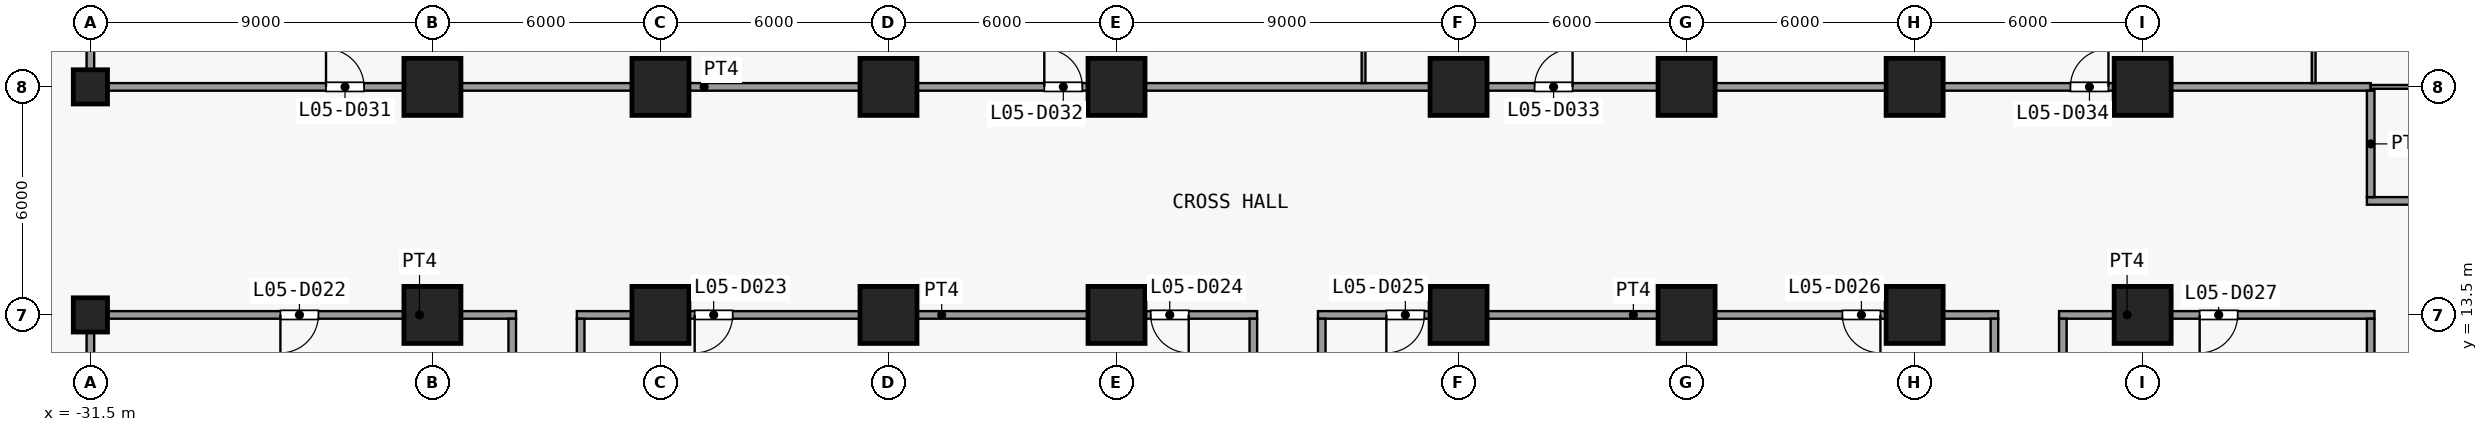
"""IFC4 building model, lengths in metres.
Left out: names, types, materials, properties, quantities, classifications, styles, units other than length and angle.
Written with IfcOpenShell. Run it as: python <this file> out.ifc"""

import sys

from ifc_helpers import new_model, si_unit, direction, frame, frame_2d, origin, origin_2d, place, context, subcontext, project, spatial, rectangle, extrude, element, fill, save


model = new_model("IFC4")
c1 = context("Model", 3, precision=1e-05, world=origin(), true_north=direction((0.0, 1.0)))
c2 = subcontext(c1, "Body", "Model", "MODEL_VIEW")
j1 = project(units=[si_unit("LENGTHUNIT", "METRE"), si_unit("PLANEANGLEUNIT", "RADIAN")], contexts=[c1])
p1 = place(None, origin())
s1 = spatial("IfcSite", under=j1, at=p1, CompositionType="ELEMENT")
p2 = place(p1, origin())
s2 = spatial("IfcBuilding", under=s1, at=p2, CompositionType="ELEMENT")
p3 = place(p2, frame((0.0, 0.0, 28.0)))
s3 = spatial("IfcBuildingStorey", under=s2, at=p3, CompositionType="ELEMENT", Elevation=28.0)
for number, where, z_axis, x_axis in (
    (1, (-31.5, 13.5, 0.0), (0.0, 0.0, 1.0), (1.0, 0.0, 0.0)),
    (2, (-31.5, 19.5, 0.0), (0.0, 0.0, 1.0), (1.0, 0.0, 0.0)),
):
    element("IfcColumn", number, at=place(p3, frame(where, z_axis=z_axis, x_axis=x_axis)), inside=s3, PredefinedType="COLUMN", context=c2, shape_type="SweptSolid", body=[
        extrude(rectangle(XDim=0.9, YDim=0.9, at=origin_2d()), origin(), (0.0, 0.0, 1.0), 4.5),
    ])
for number, where, z_axis, x_axis in (
    (3, (-22.5, 13.5, 0.0), (0.0, 0.0, 1.0), (1.0, 0.0, 0.0)),
    (4, (-22.5, 19.5, 0.0), (0.0, 0.0, 1.0), (1.0, 0.0, 0.0)),
    (5, (-16.5, 13.5, 0.0), (0.0, 0.0, 1.0), (1.0, 0.0, 0.0)),
    (6, (-16.5, 19.5, 0.0), (0.0, 0.0, 1.0), (1.0, 0.0, 0.0)),
    (7, (-10.5, 13.5, 0.0), (0.0, 0.0, 1.0), (1.0, 0.0, 0.0)),
    (8, (-10.5, 19.5, 0.0), (0.0, 0.0, 1.0), (1.0, 0.0, 0.0)),
    (9, (-4.5, 13.5, 0.0), (0.0, 0.0, 1.0), (1.0, 0.0, 0.0)),
    (10, (-4.5, 19.5, 0.0), (0.0, 0.0, 1.0), (1.0, 0.0, 0.0)),
    (11, (4.5, 13.5, 0.0), (0.0, 0.0, 1.0), (1.0, 0.0, 0.0)),
    (12, (4.5, 19.5, 0.0), (0.0, 0.0, 1.0), (1.0, 0.0, 0.0)),
    (13, (10.5, 13.5, 0.0), (0.0, 0.0, 1.0), (1.0, 0.0, 0.0)),
    (14, (10.5, 19.5, 0.0), (0.0, 0.0, 1.0), (1.0, 0.0, 0.0)),
    (15, (16.5, 13.5, 0.0), (0.0, 0.0, 1.0), (1.0, 0.0, 0.0)),
    (16, (16.5, 19.5, 0.0), (0.0, 0.0, 1.0), (1.0, 0.0, 0.0)),
    (17, (22.5, 13.5, 0.0), (0.0, 0.0, 1.0), (1.0, 0.0, 0.0)),
    (18, (22.5, 19.5, 0.0), (0.0, 0.0, 1.0), (1.0, 0.0, 0.0)),
):
    element("IfcColumn", number, at=place(p3, frame(where, z_axis=z_axis, x_axis=x_axis)), inside=s3, PredefinedType="COLUMN", context=c2, shape_type="SweptSolid", body=[
        extrude(rectangle(XDim=1.5, YDim=1.5, at=origin_2d()), origin(), (0.0, 0.0, 1.0), 4.5),
    ])
p4 = place(p3, frame((-31.6, 13.5, 0.0), z_axis=(0.0, 0.0, 1.0), x_axis=(1.0, 0.0, 0.0)))
e19 = element("IfcWall", 19, at=p4, inside=s3, PredefinedType="PARTITIONING", context=c2, shape_type="SweptSolid", body=[
    extrude(rectangle(XDim=11.3, YDim=0.2, at=frame_2d((5.65, 0.0))), origin(), (0.0, 0.0, 1.0), 4.1),
])
p5 = place(p4, frame((5.1, 0.0, 0.0)))
e20 = element("IfcOpeningElement", 20, at=p5, cuts=e19, PredefinedType="OPENING", context=c2, shape_type="SweptSolid", body=[
    extrude(rectangle(XDim=1.0, YDim=2.1, at=frame_2d((0.5, 1.05))), frame((0.0, 0.11, 0.0), z_axis=(0.0, -1.0, 0.0), x_axis=(1.0, 0.0, 0.0)), (0.0, 0.0, 1.0), 0.22),
])
p6 = place(p3, frame((-18.7, 13.5, 0.0), z_axis=(0.0, 0.0, 1.0), x_axis=(1.0, 0.0, 0.0)))
e21 = element("IfcWall", 21, at=p6, inside=s3, PredefinedType="PARTITIONING", context=c2, shape_type="SweptSolid", body=[
    extrude(rectangle(XDim=17.9, YDim=0.2, at=frame_2d((8.95, 0.0))), origin(), (0.0, 0.0, 1.0), 4.1),
])
p7 = place(p6, frame((3.1, 0.0, 0.0)))
e22 = element("IfcOpeningElement", 22, at=p7, cuts=e21, PredefinedType="OPENING", context=c2, shape_type="SweptSolid", body=[
    extrude(rectangle(XDim=1.0, YDim=2.1, at=frame_2d((0.5, 1.05))), frame((0.0, 0.11, 0.0), z_axis=(0.0, -1.0, 0.0), x_axis=(1.0, 0.0, 0.0)), (0.0, 0.0, 1.0), 0.22),
])
p8 = place(p6, frame((15.1, 0.0, 0.0)))
e23 = element("IfcOpeningElement", 23, at=p8, cuts=e21, PredefinedType="OPENING", context=c2, shape_type="SweptSolid", body=[
    extrude(rectangle(XDim=1.0, YDim=2.1, at=frame_2d((0.5, 1.05))), frame((0.0, 0.11, 0.0), z_axis=(0.0, -1.0, 0.0), x_axis=(1.0, 0.0, 0.0)), (0.0, 0.0, 1.0), 0.22),
])
p9 = place(p3, frame((0.8, 13.5, 0.0), z_axis=(0.0, 0.0, 1.0), x_axis=(1.0, 0.0, 0.0)))
e24 = element("IfcWall", 24, at=p9, inside=s3, PredefinedType="PARTITIONING", context=c2, shape_type="SweptSolid", body=[
    extrude(rectangle(XDim=17.9, YDim=0.2, at=frame_2d((8.95, 0.0))), origin(), (0.0, 0.0, 1.0), 4.1),
])
p10 = place(p9, frame((1.8, 0.0, 0.0)))
e25 = element("IfcOpeningElement", 25, at=p10, cuts=e24, PredefinedType="OPENING", context=c2, shape_type="SweptSolid", body=[
    extrude(rectangle(XDim=1.0, YDim=2.1, at=frame_2d((0.5, 1.05))), frame((0.0, 0.11, 0.0), z_axis=(0.0, -1.0, 0.0), x_axis=(1.0, 0.0, 0.0)), (0.0, 0.0, 1.0), 0.22),
])
p11 = place(p9, frame((13.8, 0.0, 0.0)))
e26 = element("IfcOpeningElement", 26, at=p11, cuts=e24, PredefinedType="OPENING", context=c2, shape_type="SweptSolid", body=[
    extrude(rectangle(XDim=1.0, YDim=2.1, at=frame_2d((0.5, 1.05))), frame((0.0, 0.11, 0.0), z_axis=(0.0, -1.0, 0.0), x_axis=(1.0, 0.0, 0.0)), (0.0, 0.0, 1.0), 0.22),
])
p12 = place(p3, frame((20.3, 13.5, 0.0), z_axis=(0.0, 0.0, 1.0), x_axis=(1.0, 0.0, 0.0)))
e27 = element("IfcWall", 27, at=p12, inside=s3, PredefinedType="PARTITIONING", context=c2, shape_type="SweptSolid", body=[
    extrude(rectangle(XDim=8.3, YDim=0.2, at=frame_2d((4.15, 0.0))), origin(), (0.0, 0.0, 1.0), 4.1),
])
p13 = place(p12, frame((3.7, 0.0, 0.0)))
e28 = element("IfcOpeningElement", 28, at=p13, cuts=e27, PredefinedType="OPENING", context=c2, shape_type="SweptSolid", body=[
    extrude(rectangle(XDim=1.0, YDim=2.1, at=frame_2d((0.5, 1.05))), frame((0.0, 0.11, 0.0), z_axis=(0.0, -1.0, 0.0), x_axis=(1.0, 0.0, 0.0)), (0.0, 0.0, 1.0), 0.22),
])
p14 = place(p3, frame((28.4, 16.5, 0.0), z_axis=(0.0, 0.0, 1.0), x_axis=(1.0, 0.0, 0.0)))
e29 = element("IfcWall", 29, at=p14, inside=s3, PredefinedType="PARTITIONING", context=c2, shape_type="SweptSolid", body=[
    extrude(rectangle(XDim=24.2, YDim=0.2, at=frame_2d((12.1, 0.0))), origin(), (0.0, 0.0, 1.0), 4.1),
])
p15 = place(p14, frame((6.2, 0.0, 0.0)))
e30 = element("IfcOpeningElement", 30, at=p15, cuts=e29, PredefinedType="OPENING", context=c2, shape_type="SweptSolid", body=[
    extrude(rectangle(XDim=1.0, YDim=2.1, at=frame_2d((0.5, 1.05))), frame((0.0, 0.11, 0.0), z_axis=(0.0, -1.0, 0.0), x_axis=(1.0, 0.0, 0.0)), (0.0, 0.0, 1.0), 0.22),
])
p16 = place(p14, frame((17.0, 0.0, 0.0)))
e31 = element("IfcOpeningElement", 31, at=p16, cuts=e29, PredefinedType="OPENING", context=c2, shape_type="SweptSolid", body=[
    extrude(rectangle(XDim=1.0, YDim=2.1, at=frame_2d((0.5, 1.05))), frame((0.0, 0.11, 0.0), z_axis=(0.0, -1.0, 0.0), x_axis=(1.0, 0.0, 0.0)), (0.0, 0.0, 1.0), 0.22),
])
p17 = place(p3, frame((-31.6, 19.5, 0.0), z_axis=(0.0, 0.0, 1.0), x_axis=(1.0, 0.0, 0.0)))
e32 = element("IfcWall", 32, at=p17, inside=s3, PredefinedType="PARTITIONING", context=c2, shape_type="SweptSolid", body=[
    extrude(rectangle(XDim=60.1, YDim=0.2, at=frame_2d((30.05, 0.0))), origin(), (0.0, 0.0, 1.0), 4.1),
])
p18 = place(p17, frame((6.3, 0.0, 0.0)))
e33 = element("IfcOpeningElement", 33, at=p18, cuts=e32, PredefinedType="OPENING", context=c2, shape_type="SweptSolid", body=[
    extrude(rectangle(XDim=1.0, YDim=2.1, at=frame_2d((0.5, 1.05))), frame((0.0, 0.11, 0.0), z_axis=(0.0, -1.0, 0.0), x_axis=(1.0, 0.0, 0.0)), (0.0, 0.0, 1.0), 0.22),
])
p19 = place(p17, frame((25.2, 0.0, 0.0)))
e34 = element("IfcOpeningElement", 34, at=p19, cuts=e32, PredefinedType="OPENING", context=c2, shape_type="SweptSolid", body=[
    extrude(rectangle(XDim=1.0, YDim=2.1, at=frame_2d((0.5, 1.05))), frame((0.0, 0.11, 0.0), z_axis=(0.0, -1.0, 0.0), x_axis=(1.0, 0.0, 0.0)), (0.0, 0.0, 1.0), 0.22),
])
p20 = place(p17, frame((38.1, 0.0, 0.0)))
e35 = element("IfcOpeningElement", 35, at=p20, cuts=e32, PredefinedType="OPENING", context=c2, shape_type="SweptSolid", body=[
    extrude(rectangle(XDim=1.0, YDim=2.1, at=frame_2d((0.5, 1.05))), frame((0.0, 0.11, 0.0), z_axis=(0.0, -1.0, 0.0), x_axis=(1.0, 0.0, 0.0)), (0.0, 0.0, 1.0), 0.22),
])
p21 = place(p17, frame((52.2, 0.0, 0.0)))
e36 = element("IfcOpeningElement", 36, at=p21, cuts=e32, PredefinedType="OPENING", context=c2, shape_type="SweptSolid", body=[
    extrude(rectangle(XDim=1.0, YDim=2.1, at=frame_2d((0.5, 1.05))), frame((0.0, 0.11, 0.0), z_axis=(0.0, -1.0, 0.0), x_axis=(1.0, 0.0, 0.0)), (0.0, 0.0, 1.0), 0.22),
])
p22 = place(p3, frame((28.5, 19.5, 0.0), z_axis=(0.0, 0.0, 1.0), x_axis=(1.0, 0.0, 0.0)))
e37 = element("IfcWall", 37, at=p22, inside=s3, PredefinedType="PARTITIONING", context=c2, shape_type="SweptSolid", body=[
    extrude(rectangle(XDim=23.9, YDim=0.1, at=frame_2d((11.95, 0.0))), origin(), (0.0, 0.0, 1.0), 4.1),
])
p23 = place(p3, frame((-31.5, 1.6, 0.0), z_axis=(0.0, 0.0, 1.0), x_axis=(0.0, 1.0, 0.0)))
e38 = element("IfcWall", 38, at=p23, inside=s3, PredefinedType="PARTITIONING", context=c2, shape_type="SweptSolid", body=[
    extrude(rectangle(XDim=11.8, YDim=0.2, at=frame_2d((5.9, 0.0))), origin(), (0.0, 0.0, 1.0), 4.1),
])
p24 = place(p3, frame((-31.5, 19.6, 0.0), z_axis=(0.0, 0.0, 1.0), x_axis=(0.0, 1.0, 0.0)))
e39 = element("IfcWall", 39, at=p24, inside=s3, PredefinedType="PARTITIONING", context=c2, shape_type="SweptSolid", body=[
    extrude(rectangle(XDim=11.8, YDim=0.2, at=frame_2d((5.9, 0.0))), origin(), (0.0, 0.0, 1.0), 4.1),
])
p25 = place(p24, frame((8.3, 0.0, 0.0)))
e40 = element("IfcOpeningElement", 40, at=p25, cuts=e39, PredefinedType="OPENING", context=c2, shape_type="SweptSolid", body=[
    extrude(rectangle(XDim=1.0, YDim=2.1, at=frame_2d((0.5, 1.05))), frame((0.0, 0.11, 0.0), z_axis=(0.0, -1.0, 0.0), x_axis=(1.0, 0.0, 0.0)), (0.0, 0.0, 1.0), 0.22),
])
for number, where, z_axis, x_axis in (
    (41, (-20.4, 1.6, 0.0), (0.0, 0.0, 1.0), (0.0, 1.0, 0.0)),
    (42, (-18.6, 1.6, 0.0), (0.0, 0.0, 1.0), (0.0, 1.0, 0.0)),
    (43, (-0.9, 1.6, 0.0), (0.0, 0.0, 1.0), (0.0, 1.0, 0.0)),
    (44, (0.9, 1.6, 0.0), (0.0, 0.0, 1.0), (0.0, 1.0, 0.0)),
):
    element("IfcWall", number, at=place(p3, frame(where, z_axis=z_axis, x_axis=x_axis)), inside=s3, PredefinedType="PARTITIONING", context=c2, shape_type="SweptSolid", body=[
        extrude(rectangle(XDim=11.8, YDim=0.2, at=frame_2d((5.9, 0.0))), origin(), (0.0, 0.0, 1.0), 4.1),
    ])
p26 = place(p3, frame((2.0, 19.6, 0.0), z_axis=(0.0, 0.0, 1.0), x_axis=(0.0, 1.0, 0.0)))
e45 = element("IfcWall", 45, at=p26, inside=s3, PredefinedType="PARTITIONING", context=c2, shape_type="SweptSolid", body=[
    extrude(rectangle(XDim=5.85, YDim=0.1, at=frame_2d((2.925, 0.0))), origin(), (0.0, 0.0, 1.0), 4.1),
])
for number, where, z_axis, x_axis in (
    (46, (18.6, 1.6, 0.0), (0.0, 0.0, 1.0), (0.0, 1.0, 0.0)),
    (47, (20.4, 1.6, 0.0), (0.0, 0.0, 1.0), (0.0, 1.0, 0.0)),
):
    element("IfcWall", number, at=place(p3, frame(where, z_axis=z_axis, x_axis=x_axis)), inside=s3, PredefinedType="PARTITIONING", context=c2, shape_type="SweptSolid", body=[
        extrude(rectangle(XDim=11.8, YDim=0.2, at=frame_2d((5.9, 0.0))), origin(), (0.0, 0.0, 1.0), 4.1),
    ])
p27 = place(p3, frame((27.0, 19.6, 0.0), z_axis=(0.0, 0.0, 1.0), x_axis=(0.0, 1.0, 0.0)))
e48 = element("IfcWall", 48, at=p27, inside=s3, PredefinedType="PARTITIONING", context=c2, shape_type="SweptSolid", body=[
    extrude(rectangle(XDim=5.85, YDim=0.1, at=frame_2d((2.925, 0.0))), origin(), (0.0, 0.0, 1.0), 4.1),
])
p28 = place(p3, frame((28.5, 1.6, 0.0), z_axis=(0.0, 0.0, 1.0), x_axis=(0.0, 1.0, 0.0)))
e49 = element("IfcWall", 49, at=p28, inside=s3, PredefinedType="PARTITIONING", context=c2, shape_type="SweptSolid", body=[
    extrude(rectangle(XDim=11.8, YDim=0.2, at=frame_2d((5.9, 0.0))), origin(), (0.0, 0.0, 1.0), 4.1),
])
p29 = place(p3, frame((28.5, 16.6, 0.0), z_axis=(0.0, 0.0, 1.0), x_axis=(0.0, 1.0, 0.0)))
e50 = element("IfcWall", 50, at=p29, inside=s3, PredefinedType="PARTITIONING", context=c2, shape_type="SweptSolid", body=[
    extrude(rectangle(XDim=2.8, YDim=0.2, at=frame_2d((1.4, 0.0))), origin(), (0.0, 0.0, 1.0), 4.1),
])
p30 = place(p5, origin())
e51 = element("IfcDoor", 51, at=p30, inside=s3, OperationType="SINGLE_SWING_LEFT", PredefinedType="DOOR", context=c2, shape_type="SweptSolid", body=[
    extrude(rectangle(XDim=1.0, YDim=2.1, at=frame_2d((0.5, 1.05))), frame((0.0, 0.025, 0.0), z_axis=(0.0, -1.0, 0.0), x_axis=(1.0, 0.0, 0.0)), (0.0, 0.0, 1.0), 0.05),
])
fill(e20, e51)
p31 = place(p7, origin())
e52 = element("IfcDoor", 52, at=p31, inside=s3, OperationType="SINGLE_SWING_LEFT", PredefinedType="DOOR", context=c2, shape_type="SweptSolid", body=[
    extrude(rectangle(XDim=1.0, YDim=2.1, at=frame_2d((0.5, 1.05))), frame((0.0, 0.025, 0.0), z_axis=(0.0, -1.0, 0.0), x_axis=(1.0, 0.0, 0.0)), (0.0, 0.0, 1.0), 0.05),
])
fill(e22, e52)
p32 = place(p8, origin())
e53 = element("IfcDoor", 53, at=p32, inside=s3, OperationType="SINGLE_SWING_RIGHT", PredefinedType="DOOR", context=c2, shape_type="SweptSolid", body=[
    extrude(rectangle(XDim=1.0, YDim=2.1, at=frame_2d((0.5, 1.05))), frame((0.0, 0.025, 0.0), z_axis=(0.0, -1.0, 0.0), x_axis=(1.0, 0.0, 0.0)), (0.0, 0.0, 1.0), 0.05),
])
fill(e23, e53)
p33 = place(p10, origin())
e54 = element("IfcDoor", 54, at=p33, inside=s3, OperationType="SINGLE_SWING_LEFT", PredefinedType="DOOR", context=c2, shape_type="SweptSolid", body=[
    extrude(rectangle(XDim=1.0, YDim=2.1, at=frame_2d((0.5, 1.05))), frame((0.0, 0.025, 0.0), z_axis=(0.0, -1.0, 0.0), x_axis=(1.0, 0.0, 0.0)), (0.0, 0.0, 1.0), 0.05),
])
fill(e25, e54)
p34 = place(p11, origin())
e55 = element("IfcDoor", 55, at=p34, inside=s3, OperationType="SINGLE_SWING_RIGHT", PredefinedType="DOOR", context=c2, shape_type="SweptSolid", body=[
    extrude(rectangle(XDim=1.0, YDim=2.1, at=frame_2d((0.5, 1.05))), frame((0.0, 0.025, 0.0), z_axis=(0.0, -1.0, 0.0), x_axis=(1.0, 0.0, 0.0)), (0.0, 0.0, 1.0), 0.05),
])
fill(e26, e55)
p35 = place(p13, origin())
e56 = element("IfcDoor", 56, at=p35, inside=s3, OperationType="SINGLE_SWING_LEFT", PredefinedType="DOOR", context=c2, shape_type="SweptSolid", body=[
    extrude(rectangle(XDim=1.0, YDim=2.1, at=frame_2d((0.5, 1.05))), frame((0.0, 0.025, 0.0), z_axis=(0.0, -1.0, 0.0), x_axis=(1.0, 0.0, 0.0)), (0.0, 0.0, 1.0), 0.05),
])
fill(e28, e56)
p36 = place(p18, origin())
e57 = element("IfcDoor", 57, at=p36, inside=s3, OperationType="SINGLE_SWING_RIGHT", PredefinedType="DOOR", context=c2, shape_type="SweptSolid", body=[
    extrude(rectangle(XDim=1.0, YDim=2.1, at=frame_2d((0.5, 1.05))), frame((0.0, 0.025, 0.0), z_axis=(0.0, -1.0, 0.0), x_axis=(1.0, 0.0, 0.0)), (0.0, 0.0, 1.0), 0.05),
])
fill(e33, e57)
p37 = place(p19, origin())
e58 = element("IfcDoor", 58, at=p37, inside=s3, OperationType="SINGLE_SWING_RIGHT", PredefinedType="DOOR", context=c2, shape_type="SweptSolid", body=[
    extrude(rectangle(XDim=1.0, YDim=2.1, at=frame_2d((0.5, 1.05))), frame((0.0, 0.025, 0.0), z_axis=(0.0, -1.0, 0.0), x_axis=(1.0, 0.0, 0.0)), (0.0, 0.0, 1.0), 0.05),
])
fill(e34, e58)
p38 = place(p20, origin())
e59 = element("IfcDoor", 59, at=p38, inside=s3, OperationType="SINGLE_SWING_LEFT", PredefinedType="DOOR", context=c2, shape_type="SweptSolid", body=[
    extrude(rectangle(XDim=1.0, YDim=2.1, at=frame_2d((0.5, 1.05))), frame((0.0, 0.025, 0.0), z_axis=(0.0, -1.0, 0.0), x_axis=(1.0, 0.0, 0.0)), (0.0, 0.0, 1.0), 0.05),
])
fill(e35, e59)
p39 = place(p21, origin())
e60 = element("IfcDoor", 60, at=p39, inside=s3, OperationType="SINGLE_SWING_LEFT", PredefinedType="DOOR", context=c2, shape_type="SweptSolid", body=[
    extrude(rectangle(XDim=1.0, YDim=2.1, at=frame_2d((0.5, 1.05))), frame((0.0, 0.025, 0.0), z_axis=(0.0, -1.0, 0.0), x_axis=(1.0, 0.0, 0.0)), (0.0, 0.0, 1.0), 0.05),
])
fill(e36, e60)
save(model, sys.argv[1])
